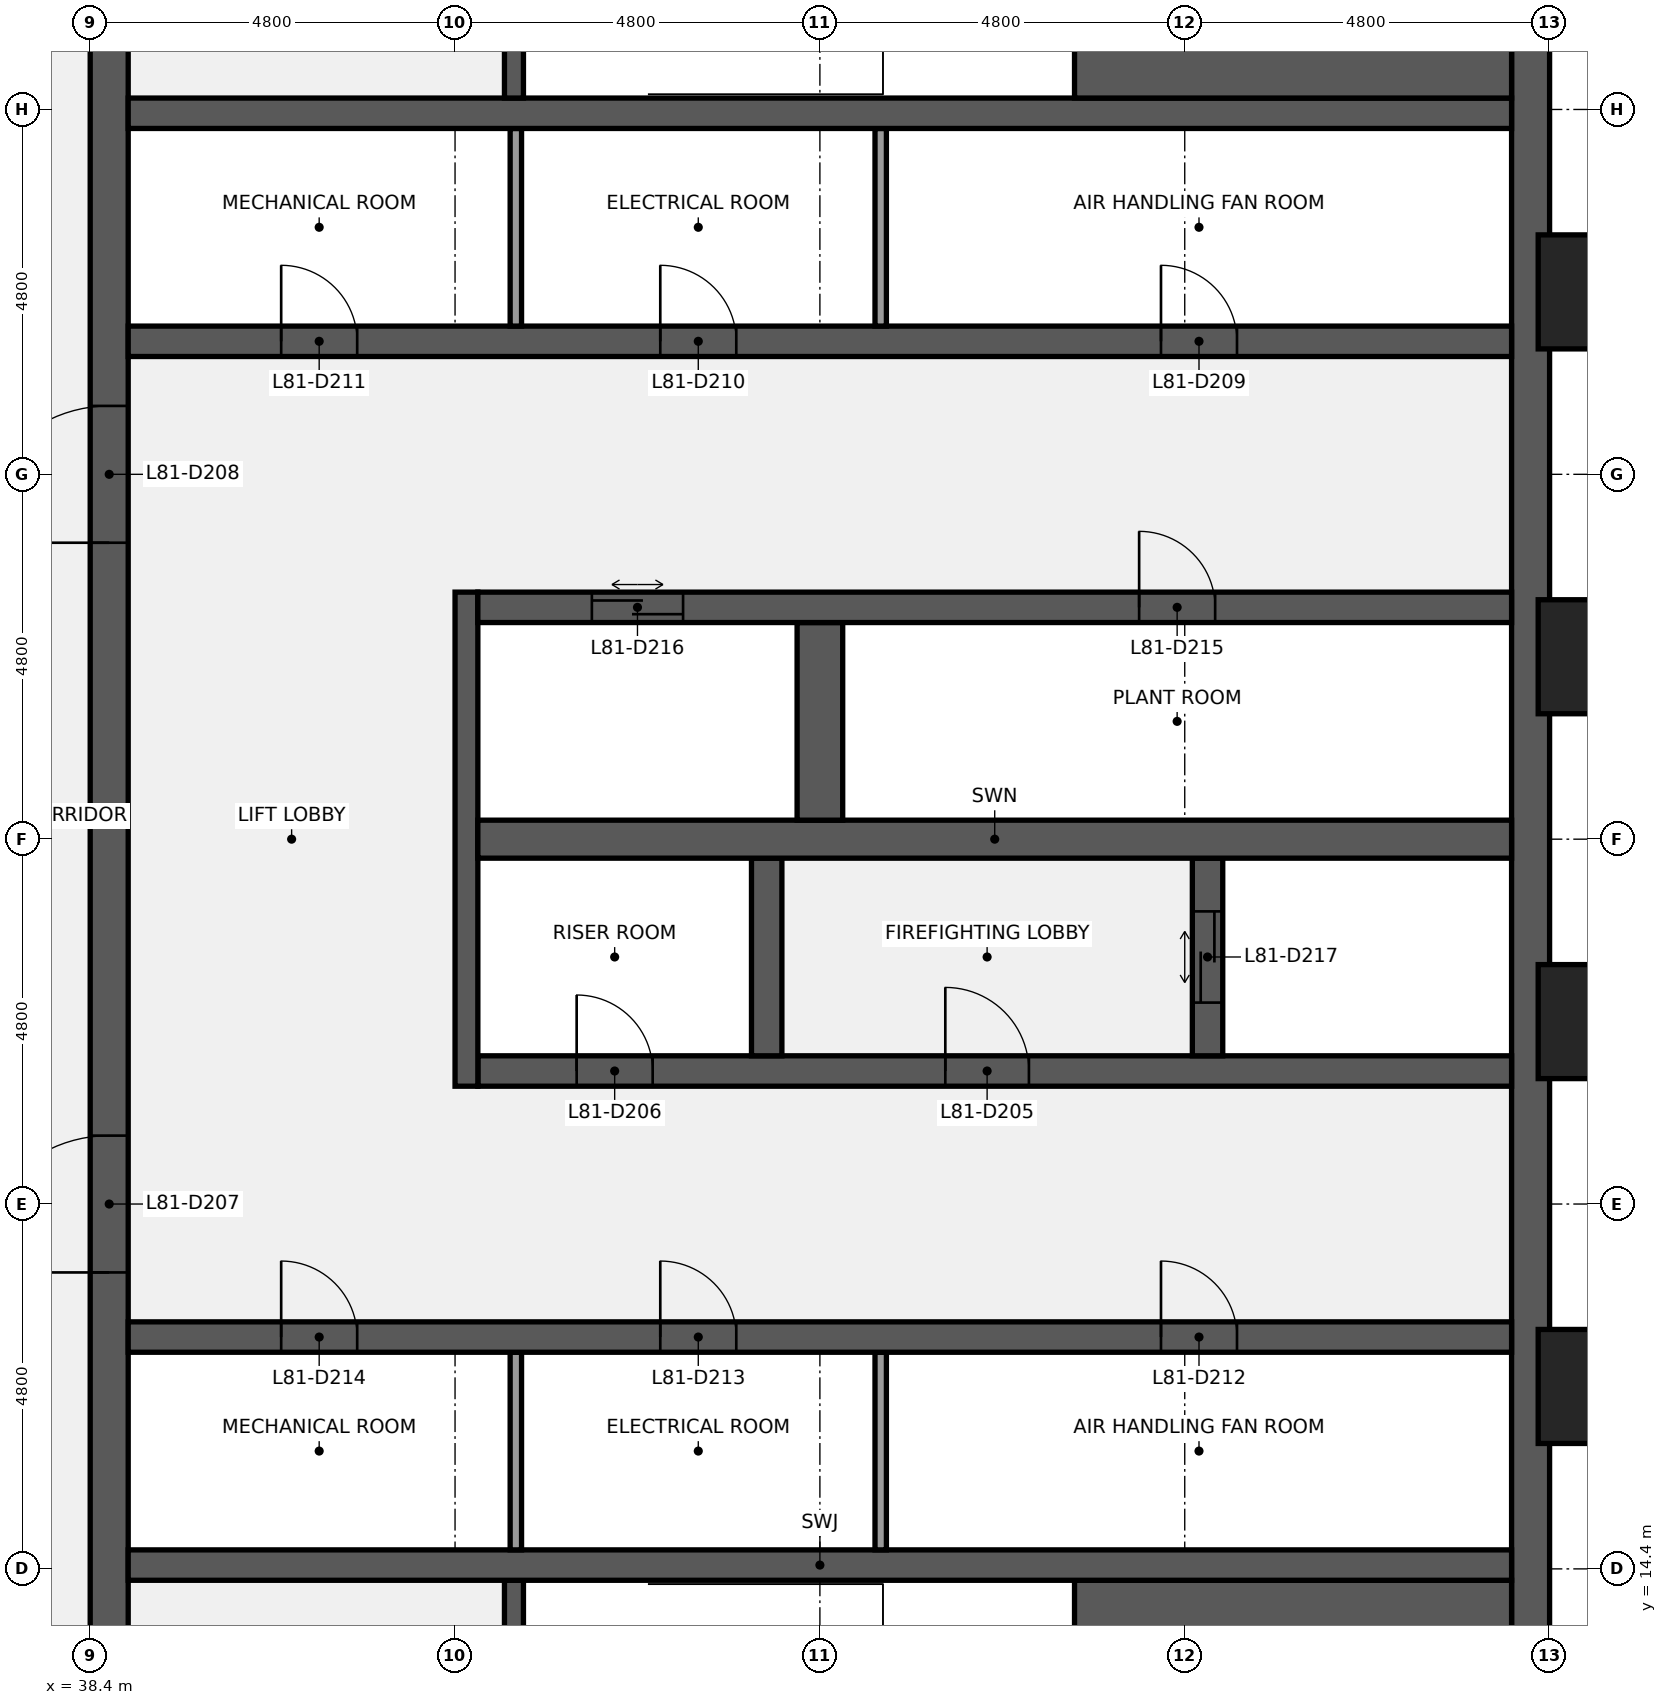
"""IFC4 building model, lengths in metres.
Left out: names, types, materials, properties, quantities, classifications, styles, units other than length and angle.
Written with IfcOpenShell. Run it as: python <this file> out.ifc"""

import sys

from ifc_helpers import new_model, si_unit, direction, frame, frame_2d, origin, origin_2d, place, context, subcontext, project, spatial, rectangle, extrude, element, fill, save


model = new_model("IFC4")
c1 = context("Model", 3, precision=1e-05, world=origin(), true_north=direction((0.0, 1.0)))
c2 = subcontext(c1, "Body", "Model", "MODEL_VIEW")
j1 = project(units=[si_unit("LENGTHUNIT", "METRE"), si_unit("PLANEANGLEUNIT", "RADIAN")], contexts=[c1])
p1 = place(None, origin())
s1 = spatial("IfcSite", under=j1, at=p1, CompositionType="ELEMENT")
p2 = place(p1, origin())
s2 = spatial("IfcBuilding", under=s1, at=p2, CompositionType="ELEMENT")
p3 = place(p2, frame((0.0, 0.0, 362.3)))
s3 = spatial("IfcBuildingStorey", under=s2, at=p3, CompositionType="ELEMENT", Elevation=362.3)
p4 = place(p3, frame((57.35, 38.4, 0.0), z_axis=(0.0, 0.0, 1.0), x_axis=(0.0, -1.0, 0.0)))
e1 = element("IfcWall", 1, at=p4, inside=s3, PredefinedType="SHEAR", context=c2, shape_type="SweptSolid", body=[
    extrude(rectangle(XDim=28.8, YDim=0.5, at=frame_2d((14.4, 0.0))), origin(), (0.0, 0.0, 1.0), 3.75),
])
p5 = place(p3, frame((38.65, 9.6, 0.0), z_axis=(0.0, 0.0, 1.0), x_axis=(0.0, 1.0, 0.0)))
e2 = element("IfcWall", 2, at=p5, inside=s3, PredefinedType="SHEAR", context=c2, shape_type="SweptSolid", body=[
    extrude(rectangle(XDim=28.8, YDim=0.5, at=frame_2d((14.4, 0.0))), origin(), (0.0, 0.0, 1.0), 3.75),
])
p6 = place(p5, frame((8.7, 0.0, 0.0)))
e3 = element("IfcOpeningElement", 3, at=p6, cuts=e2, PredefinedType="OPENING", context=c2, shape_type="SweptSolid", body=[
    extrude(rectangle(XDim=1.8, YDim=2.1, at=frame_2d((0.9, 1.05))), frame((0.0, 0.26, 0.0), z_axis=(0.0, -1.0, 0.0), x_axis=(1.0, 0.0, 0.0)), (0.0, 0.0, 1.0), 0.52),
])
p7 = place(p5, frame((18.3, 0.0, 0.0)))
e4 = element("IfcOpeningElement", 4, at=p7, cuts=e2, PredefinedType="OPENING", context=c2, shape_type="SweptSolid", body=[
    extrude(rectangle(XDim=1.8, YDim=2.1, at=frame_2d((0.9, 1.05))), frame((0.0, 0.26, 0.0), z_axis=(0.0, -1.0, 0.0), x_axis=(1.0, 0.0, 0.0)), (0.0, 0.0, 1.0), 0.52),
])
p8 = place(p3, frame((51.35, 12.175, 0.0), z_axis=(0.0, 0.0, 1.0), x_axis=(1.0, 0.0, 0.0)))
e5 = element("IfcWall", 5, at=p8, inside=s3, PredefinedType="SHEAR", context=c2, shape_type="SweptSolid", body=[
    extrude(rectangle(XDim=5.75, YDim=4.15, at=frame_2d((2.875, 0.0))), origin(), (0.0, 0.0, 1.0), 3.75),
])
p9 = place(p3, frame((43.975, 10.8, 0.0), z_axis=(0.0, 0.0, 1.0), x_axis=(0.0, 1.0, 0.0)))
e6 = element("IfcWall", 6, at=p9, inside=s3, PredefinedType="SHEAR", context=c2, shape_type="SweptSolid", body=[
    extrude(rectangle(XDim=3.45, YDim=0.25, at=frame_2d((1.725, 0.0))), origin(), (0.0, 0.0, 1.0), 3.75),
])
p10 = place(p9, frame((1.175, 0.0, 0.0)))
e7 = element("IfcOpeningElement", 7, at=p10, cuts=e6, PredefinedType="OPENING", context=c2, shape_type="SweptSolid", body=[
    extrude(rectangle(XDim=1.1, YDim=2.1, at=frame_2d((0.55, 1.05))), frame((0.0, 0.135, 0.0), z_axis=(0.0, -1.0, 0.0), x_axis=(1.0, 0.0, 0.0)), (0.0, 0.0, 1.0), 0.27),
])
p11 = place(p3, frame((38.9, 14.45, 0.0), z_axis=(0.0, 0.0, 1.0), x_axis=(1.0, 0.0, 0.0)))
e8 = element("IfcWall", 8, at=p11, inside=s3, PredefinedType="SHEAR", context=c2, shape_type="SweptSolid", body=[
    extrude(rectangle(XDim=18.2, YDim=0.4, at=frame_2d((9.1, 0.0))), origin(), (0.0, 0.0, 1.0), 3.75),
])
for number, where, z_axis, x_axis in (
    (9, (48.8, 14.65, 0.0), (0.0, 0.0, 1.0), (0.0, 1.0, 0.0)),
    (10, (44.0, 14.65, 0.0), (0.0, 0.0, 1.0), (0.0, 1.0, 0.0)),
):
    element("IfcWall", number, at=place(p3, frame(where, z_axis=z_axis, x_axis=x_axis)), inside=s3, PredefinedType="PARTITIONING", context=c2, shape_type="SweptSolid", body=[
        extrude(rectangle(XDim=2.6, YDim=0.15, at=frame_2d((1.3, 0.0))), origin(), (0.0, 0.0, 1.0), 3.75),
    ])
p12 = place(p3, frame((38.9, 17.45, 0.0), z_axis=(0.0, 0.0, 1.0), x_axis=(1.0, 0.0, 0.0)))
e11 = element("IfcWall", 11, at=p12, inside=s3, PredefinedType="SHEAR", context=c2, shape_type="SweptSolid", body=[
    extrude(rectangle(XDim=18.2, YDim=0.4, at=frame_2d((9.1, 0.0))), origin(), (0.0, 0.0, 1.0), 3.75),
])
p13 = place(p12, frame((13.587, 0.0, 0.0)))
e12 = element("IfcOpeningElement", 12, at=p13, cuts=e11, PredefinedType="OPENING", context=c2, shape_type="SweptSolid", body=[
    extrude(rectangle(XDim=1.0, YDim=2.1, at=frame_2d((0.5, 1.05))), frame((0.0, 0.21, 0.0), z_axis=(0.0, -1.0, 0.0), x_axis=(1.0, 0.0, 0.0)), (0.0, 0.0, 1.0), 0.42),
])
p14 = place(p12, frame((7.0, 0.0, 0.0)))
e13 = element("IfcOpeningElement", 13, at=p14, cuts=e11, PredefinedType="OPENING", context=c2, shape_type="SweptSolid", body=[
    extrude(rectangle(XDim=1.0, YDim=2.1, at=frame_2d((0.5, 1.05))), frame((0.0, 0.21, 0.0), z_axis=(0.0, -1.0, 0.0), x_axis=(1.0, 0.0, 0.0)), (0.0, 0.0, 1.0), 0.42),
])
p15 = place(p12, frame((2.012, 0.0, 0.0)))
e14 = element("IfcOpeningElement", 14, at=p15, cuts=e11, PredefinedType="OPENING", context=c2, shape_type="SweptSolid", body=[
    extrude(rectangle(XDim=1.0, YDim=2.1, at=frame_2d((0.5, 1.05))), frame((0.0, 0.21, 0.0), z_axis=(0.0, -1.0, 0.0), x_axis=(1.0, 0.0, 0.0)), (0.0, 0.0, 1.0), 0.42),
])
p16 = place(p3, frame((43.5, 20.95, 0.0), z_axis=(0.0, 0.0, 1.0), x_axis=(1.0, 0.0, 0.0)))
e15 = element("IfcWall", 15, at=p16, inside=s3, PredefinedType="SHEAR", context=c2, shape_type="SweptSolid", body=[
    extrude(rectangle(XDim=13.6, YDim=0.4, at=frame_2d((6.8, 0.0))), origin(), (0.0, 0.0, 1.0), 3.75),
])
p17 = place(p16, frame((6.15, 0.0, 0.0)))
e16 = element("IfcOpeningElement", 16, at=p17, cuts=e15, PredefinedType="OPENING", context=c2, shape_type="SweptSolid", body=[
    extrude(rectangle(XDim=1.1, YDim=2.1, at=frame_2d((0.55, 1.05))), frame((0.0, 0.21, 0.0), z_axis=(0.0, -1.0, 0.0), x_axis=(1.0, 0.0, 0.0)), (0.0, 0.0, 1.0), 0.42),
])
p18 = place(p16, frame((1.3, 0.0, 0.0)))
e17 = element("IfcOpeningElement", 17, at=p18, cuts=e15, PredefinedType="OPENING", context=c2, shape_type="SweptSolid", body=[
    extrude(rectangle(XDim=1.0, YDim=2.1, at=frame_2d((0.5, 1.05))), frame((0.0, 0.21, 0.0), z_axis=(0.0, -1.0, 0.0), x_axis=(1.0, 0.0, 0.0)), (0.0, 0.0, 1.0), 0.42),
])
p19 = place(p3, frame((43.35, 20.75, 0.0), z_axis=(0.0, 0.0, 1.0), x_axis=(0.0, 1.0, 0.0)))
e18 = element("IfcWall", 18, at=p19, inside=s3, PredefinedType="SHEAR", context=c2, shape_type="SweptSolid", body=[
    extrude(rectangle(XDim=6.5, YDim=0.3, at=frame_2d((3.25, 0.0))), origin(), (0.0, 0.0, 1.0), 3.75),
])
p20 = place(p3, frame((53.1, 21.15, 0.0), z_axis=(0.0, 0.0, 1.0), x_axis=(0.0, 1.0, 0.0)))
e19 = element("IfcWall", 19, at=p20, inside=s3, PredefinedType="SHEAR", context=c2, shape_type="SweptSolid", body=[
    extrude(rectangle(XDim=2.6, YDim=0.4, at=frame_2d((1.3, 0.0))), origin(), (0.0, 0.0, 1.0), 3.75),
])
p21 = place(p20, frame((0.7, 0.0, 0.0)))
e20 = element("IfcOpeningElement", 20, at=p21, cuts=e19, PredefinedType="OPENING", context=c2, shape_type="SweptSolid", body=[
    extrude(rectangle(XDim=1.2, YDim=2.1, at=frame_2d((0.6, 1.05))), frame((0.0, 0.21, 0.0), z_axis=(0.0, -1.0, 0.0), x_axis=(1.0, 0.0, 0.0)), (0.0, 0.0, 1.0), 0.42),
])
p22 = place(p3, frame((47.3, 21.15, 0.0), z_axis=(0.0, 0.0, 1.0), x_axis=(0.0, 1.0, 0.0)))
e21 = element("IfcWall", 21, at=p22, inside=s3, PredefinedType="SHEAR", context=c2, shape_type="SweptSolid", body=[
    extrude(rectangle(XDim=2.6, YDim=0.4, at=frame_2d((1.3, 0.0))), origin(), (0.0, 0.0, 1.0), 3.75),
])
p23 = place(p3, frame((43.5, 24.0, 0.0), z_axis=(0.0, 0.0, 1.0), x_axis=(1.0, 0.0, 0.0)))
e22 = element("IfcWall", 22, at=p23, inside=s3, PredefinedType="SHEAR", context=c2, shape_type="SweptSolid", body=[
    extrude(rectangle(XDim=13.6, YDim=0.5, at=frame_2d((6.8, 0.0))), origin(), (0.0, 0.0, 1.0), 3.75),
])
p24 = place(p3, frame((48.0, 24.25, 0.0), z_axis=(0.0, 0.0, 1.0), x_axis=(0.0, 1.0, 0.0)))
e23 = element("IfcWall", 23, at=p24, inside=s3, PredefinedType="SHEAR", context=c2, shape_type="SweptSolid", body=[
    extrude(rectangle(XDim=2.6, YDim=0.6, at=frame_2d((1.3, 0.0))), origin(), (0.0, 0.0, 1.0), 3.75),
])
p25 = place(p3, frame((43.5, 27.05, 0.0), z_axis=(0.0, 0.0, 1.0), x_axis=(1.0, 0.0, 0.0)))
e24 = element("IfcWall", 24, at=p25, inside=s3, PredefinedType="SHEAR", context=c2, shape_type="SweptSolid", body=[
    extrude(rectangle(XDim=13.6, YDim=0.4, at=frame_2d((6.8, 0.0))), origin(), (0.0, 0.0, 1.0), 3.75),
])
p26 = place(p25, frame((8.7, 0.0, 0.0)))
e25 = element("IfcOpeningElement", 25, at=p26, cuts=e24, PredefinedType="OPENING", context=c2, shape_type="SweptSolid", body=[
    extrude(rectangle(XDim=1.0, YDim=2.1, at=frame_2d((0.5, 1.05))), frame((0.0, 0.21, 0.0), z_axis=(0.0, -1.0, 0.0), x_axis=(1.0, 0.0, 0.0)), (0.0, 0.0, 1.0), 0.42),
])
p27 = place(p25, frame((1.5, 0.0, 0.0)))
e26 = element("IfcOpeningElement", 26, at=p27, cuts=e24, PredefinedType="OPENING", context=c2, shape_type="SweptSolid", body=[
    extrude(rectangle(XDim=1.2, YDim=2.1, at=frame_2d((0.6, 1.05))), frame((0.0, 0.21, 0.0), z_axis=(0.0, -1.0, 0.0), x_axis=(1.0, 0.0, 0.0)), (0.0, 0.0, 1.0), 0.42),
])
p28 = place(p3, frame((38.9, 30.55, 0.0), z_axis=(0.0, 0.0, 1.0), x_axis=(1.0, 0.0, 0.0)))
e27 = element("IfcWall", 27, at=p28, inside=s3, PredefinedType="SHEAR", context=c2, shape_type="SweptSolid", body=[
    extrude(rectangle(XDim=18.2, YDim=0.4, at=frame_2d((9.1, 0.0))), origin(), (0.0, 0.0, 1.0), 3.75),
])
p29 = place(p28, frame((13.587, 0.0, 0.0)))
e28 = element("IfcOpeningElement", 28, at=p29, cuts=e27, PredefinedType="OPENING", context=c2, shape_type="SweptSolid", body=[
    extrude(rectangle(XDim=1.0, YDim=2.1, at=frame_2d((0.5, 1.05))), frame((0.0, 0.21, 0.0), z_axis=(0.0, -1.0, 0.0), x_axis=(1.0, 0.0, 0.0)), (0.0, 0.0, 1.0), 0.42),
])
p30 = place(p28, frame((7.0, 0.0, 0.0)))
e29 = element("IfcOpeningElement", 29, at=p30, cuts=e27, PredefinedType="OPENING", context=c2, shape_type="SweptSolid", body=[
    extrude(rectangle(XDim=1.0, YDim=2.1, at=frame_2d((0.5, 1.05))), frame((0.0, 0.21, 0.0), z_axis=(0.0, -1.0, 0.0), x_axis=(1.0, 0.0, 0.0)), (0.0, 0.0, 1.0), 0.42),
])
p31 = place(p28, frame((2.012, 0.0, 0.0)))
e30 = element("IfcOpeningElement", 30, at=p31, cuts=e27, PredefinedType="OPENING", context=c2, shape_type="SweptSolid", body=[
    extrude(rectangle(XDim=1.0, YDim=2.1, at=frame_2d((0.5, 1.05))), frame((0.0, 0.21, 0.0), z_axis=(0.0, -1.0, 0.0), x_axis=(1.0, 0.0, 0.0)), (0.0, 0.0, 1.0), 0.42),
])
for number, where, z_axis, x_axis in (
    (31, (48.8, 30.75, 0.0), (0.0, 0.0, 1.0), (0.0, 1.0, 0.0)),
    (32, (44.0, 30.75, 0.0), (0.0, 0.0, 1.0), (0.0, 1.0, 0.0)),
):
    element("IfcWall", number, at=place(p3, frame(where, z_axis=z_axis, x_axis=x_axis)), inside=s3, PredefinedType="PARTITIONING", context=c2, shape_type="SweptSolid", body=[
        extrude(rectangle(XDim=2.6, YDim=0.15, at=frame_2d((1.3, 0.0))), origin(), (0.0, 0.0, 1.0), 3.75),
    ])
p32 = place(p3, frame((38.9, 33.55, 0.0), z_axis=(0.0, 0.0, 1.0), x_axis=(1.0, 0.0, 0.0)))
e33 = element("IfcWall", 33, at=p32, inside=s3, PredefinedType="SHEAR", context=c2, shape_type="SweptSolid", body=[
    extrude(rectangle(XDim=18.2, YDim=0.4, at=frame_2d((9.1, 0.0))), origin(), (0.0, 0.0, 1.0), 3.75),
])
p33 = place(p3, frame((51.35, 35.825, 0.0), z_axis=(0.0, 0.0, 1.0), x_axis=(1.0, 0.0, 0.0)))
e34 = element("IfcWall", 34, at=p33, inside=s3, PredefinedType="SHEAR", context=c2, shape_type="SweptSolid", body=[
    extrude(rectangle(XDim=5.75, YDim=4.15, at=frame_2d((2.875, 0.0))), origin(), (0.0, 0.0, 1.0), 3.75),
])
p34 = place(p3, frame((43.975, 33.75, 0.0), z_axis=(0.0, 0.0, 1.0), x_axis=(0.0, 1.0, 0.0)))
e35 = element("IfcWall", 35, at=p34, inside=s3, PredefinedType="SHEAR", context=c2, shape_type="SweptSolid", body=[
    extrude(rectangle(XDim=3.45, YDim=0.25, at=frame_2d((1.725, 0.0))), origin(), (0.0, 0.0, 1.0), 3.75),
])
p35 = place(p34, frame((1.175, 0.0, 0.0)))
e36 = element("IfcOpeningElement", 36, at=p35, cuts=e35, PredefinedType="OPENING", context=c2, shape_type="SweptSolid", body=[
    extrude(rectangle(XDim=1.1, YDim=2.1, at=frame_2d((0.55, 1.05))), frame((0.0, 0.135, 0.0), z_axis=(0.0, -1.0, 0.0), x_axis=(1.0, 0.0, 0.0)), (0.0, 0.0, 1.0), 0.27),
])
for number, where, z_axis, x_axis in (
    (37, (58.35, 16.8, 0.0), (0.0, 0.0, 1.0), (0.0, 1.0, 0.0)),
    (38, (58.35, 21.6, 0.0), (0.0, 0.0, 1.0), (0.0, 1.0, 0.0)),
    (39, (58.35, 26.4, 0.0), (0.0, 0.0, 1.0), (0.0, 1.0, 0.0)),
    (40, (58.35, 31.2, 0.0), (0.0, 0.0, 1.0), (0.0, 1.0, 0.0)),
):
    element("IfcColumn", number, at=place(p3, frame(where, z_axis=z_axis, x_axis=x_axis)), inside=s3, PredefinedType="PILASTER", context=c2, shape_type="SweptSolid", body=[
        extrude(rectangle(XDim=1.8, YDim=1.5, at=origin_2d()), origin(), (0.0, 0.0, 1.0), 4.0),
    ])
p36 = place(p17, origin())
e41 = element("IfcDoor", 41, at=p36, inside=s3, OperationType="SINGLE_SWING_LEFT", PredefinedType="DOOR", context=c2, shape_type="SweptSolid", body=[
    extrude(rectangle(XDim=1.1, YDim=2.1, at=frame_2d((0.55, 1.05))), frame((0.0, 0.025, 0.0), z_axis=(0.0, -1.0, 0.0), x_axis=(1.0, 0.0, 0.0)), (0.0, 0.0, 1.0), 0.05),
])
fill(e16, e41)
p37 = place(p18, origin())
e42 = element("IfcDoor", 42, at=p37, inside=s3, OperationType="SINGLE_SWING_LEFT", PredefinedType="DOOR", context=c2, shape_type="SweptSolid", body=[
    extrude(rectangle(XDim=1.0, YDim=2.1, at=frame_2d((0.5, 1.05))), frame((0.0, 0.025, 0.0), z_axis=(0.0, -1.0, 0.0), x_axis=(1.0, 0.0, 0.0)), (0.0, 0.0, 1.0), 0.05),
])
fill(e17, e42)
p38 = place(p6, origin())
e43 = element("IfcDoor", 43, at=p38, inside=s3, OperationType="DOUBLE_DOOR_SINGLE_SWING", PredefinedType="DOOR", context=c2, shape_type="SweptSolid", body=[
    extrude(rectangle(XDim=1.8, YDim=2.1, at=frame_2d((0.9, 1.05))), frame((0.0, 0.025, 0.0), z_axis=(0.0, -1.0, 0.0), x_axis=(1.0, 0.0, 0.0)), (0.0, 0.0, 1.0), 0.05),
])
fill(e3, e43)
p39 = place(p7, origin())
e44 = element("IfcDoor", 44, at=p39, inside=s3, OperationType="DOUBLE_DOOR_SINGLE_SWING", PredefinedType="DOOR", context=c2, shape_type="SweptSolid", body=[
    extrude(rectangle(XDim=1.8, YDim=2.1, at=frame_2d((0.9, 1.05))), frame((0.0, 0.025, 0.0), z_axis=(0.0, -1.0, 0.0), x_axis=(1.0, 0.0, 0.0)), (0.0, 0.0, 1.0), 0.05),
])
fill(e4, e44)
p40 = place(p29, origin())
e45 = element("IfcDoor", 45, at=p40, inside=s3, OperationType="SINGLE_SWING_LEFT", PredefinedType="DOOR", context=c2, shape_type="SweptSolid", body=[
    extrude(rectangle(XDim=1.0, YDim=2.1, at=frame_2d((0.5, 1.05))), frame((0.0, 0.025, 0.0), z_axis=(0.0, -1.0, 0.0), x_axis=(1.0, 0.0, 0.0)), (0.0, 0.0, 1.0), 0.05),
])
fill(e28, e45)
p41 = place(p30, origin())
e46 = element("IfcDoor", 46, at=p41, inside=s3, OperationType="SINGLE_SWING_LEFT", PredefinedType="DOOR", context=c2, shape_type="SweptSolid", body=[
    extrude(rectangle(XDim=1.0, YDim=2.1, at=frame_2d((0.5, 1.05))), frame((0.0, 0.025, 0.0), z_axis=(0.0, -1.0, 0.0), x_axis=(1.0, 0.0, 0.0)), (0.0, 0.0, 1.0), 0.05),
])
fill(e29, e46)
p42 = place(p31, origin())
e47 = element("IfcDoor", 47, at=p42, inside=s3, OperationType="SINGLE_SWING_LEFT", PredefinedType="DOOR", context=c2, shape_type="SweptSolid", body=[
    extrude(rectangle(XDim=1.0, YDim=2.1, at=frame_2d((0.5, 1.05))), frame((0.0, 0.025, 0.0), z_axis=(0.0, -1.0, 0.0), x_axis=(1.0, 0.0, 0.0)), (0.0, 0.0, 1.0), 0.05),
])
fill(e30, e47)
p43 = place(p13, origin())
e48 = element("IfcDoor", 48, at=p43, inside=s3, OperationType="SINGLE_SWING_LEFT", PredefinedType="DOOR", context=c2, shape_type="SweptSolid", body=[
    extrude(rectangle(XDim=1.0, YDim=2.1, at=frame_2d((0.5, 1.05))), frame((0.0, 0.025, 0.0), z_axis=(0.0, -1.0, 0.0), x_axis=(1.0, 0.0, 0.0)), (0.0, 0.0, 1.0), 0.05),
])
fill(e12, e48)
p44 = place(p14, origin())
e49 = element("IfcDoor", 49, at=p44, inside=s3, OperationType="SINGLE_SWING_LEFT", PredefinedType="DOOR", context=c2, shape_type="SweptSolid", body=[
    extrude(rectangle(XDim=1.0, YDim=2.1, at=frame_2d((0.5, 1.05))), frame((0.0, 0.025, 0.0), z_axis=(0.0, -1.0, 0.0), x_axis=(1.0, 0.0, 0.0)), (0.0, 0.0, 1.0), 0.05),
])
fill(e13, e49)
p45 = place(p15, origin())
e50 = element("IfcDoor", 50, at=p45, inside=s3, OperationType="SINGLE_SWING_LEFT", PredefinedType="DOOR", context=c2, shape_type="SweptSolid", body=[
    extrude(rectangle(XDim=1.0, YDim=2.1, at=frame_2d((0.5, 1.05))), frame((0.0, 0.025, 0.0), z_axis=(0.0, -1.0, 0.0), x_axis=(1.0, 0.0, 0.0)), (0.0, 0.0, 1.0), 0.05),
])
fill(e14, e50)
p46 = place(p26, origin())
e51 = element("IfcDoor", 51, at=p46, inside=s3, OperationType="SINGLE_SWING_LEFT", PredefinedType="DOOR", context=c2, shape_type="SweptSolid", body=[
    extrude(rectangle(XDim=1.0, YDim=2.1, at=frame_2d((0.5, 1.05))), frame((0.0, 0.025, 0.0), z_axis=(0.0, -1.0, 0.0), x_axis=(1.0, 0.0, 0.0)), (0.0, 0.0, 1.0), 0.05),
])
fill(e25, e51)
p47 = place(p27, origin())
e52 = element("IfcDoor", 52, at=p47, inside=s3, OperationType="DOUBLE_DOOR_SLIDING", PredefinedType="DOOR", context=c2, shape_type="SweptSolid", body=[
    extrude(rectangle(XDim=1.2, YDim=2.1, at=frame_2d((0.6, 1.05))), frame((0.0, 0.025, 0.0), z_axis=(0.0, -1.0, 0.0), x_axis=(1.0, 0.0, 0.0)), (0.0, 0.0, 1.0), 0.05),
])
fill(e26, e52)
p48 = place(p21, origin())
e53 = element("IfcDoor", 53, at=p48, inside=s3, OperationType="DOUBLE_DOOR_SLIDING", PredefinedType="DOOR", context=c2, shape_type="SweptSolid", body=[
    extrude(rectangle(XDim=1.2, YDim=2.1, at=frame_2d((0.6, 1.05))), frame((0.0, 0.025, 0.0), z_axis=(0.0, -1.0, 0.0), x_axis=(1.0, 0.0, 0.0)), (0.0, 0.0, 1.0), 0.05),
])
fill(e20, e53)
save(model, sys.argv[1])
